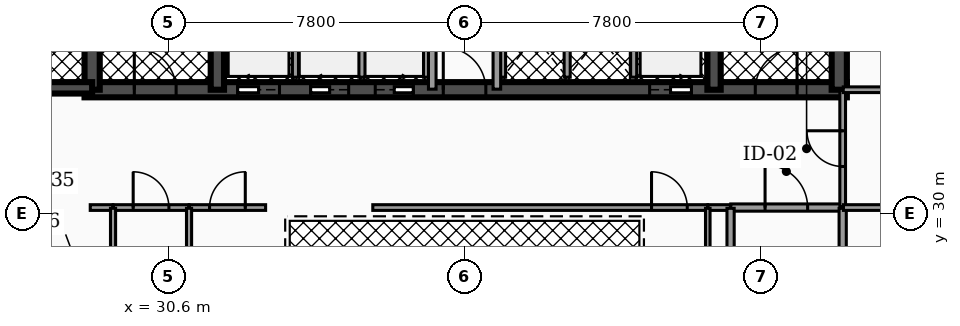
"""IFC4 building model, lengths in metres.
Left out: names, types, materials, properties, quantities, classifications, styles, units other than length and angle.
Written with IfcOpenShell. Run it as: python <this file> out.ifc"""

import sys

from ifc_helpers import new_model, si_unit, direction, frame, frame_2d, origin, place, context, subcontext, project, spatial, rectangle, extrude, element, fill, save


model = new_model("IFC4")
c1 = context("Model", 3, precision=1e-05, world=origin(), true_north=direction((0.0, 1.0)))
c2 = subcontext(c1, "Body", "Model", "MODEL_VIEW")
j1 = project(units=[si_unit("LENGTHUNIT", "METRE"), si_unit("PLANEANGLEUNIT", "RADIAN")], contexts=[c1])
p1 = place(None, origin())
s1 = spatial("IfcSite", under=j1, at=p1, CompositionType="ELEMENT")
p2 = place(p1, origin())
s2 = spatial("IfcBuilding", under=s1, at=p2, CompositionType="ELEMENT")
p3 = place(p2, frame((0.0, 0.0, 183.26)))
s3 = spatial("IfcBuildingStorey", under=s2, at=p3, CompositionType="ELEMENT", Elevation=183.26)
p4 = place(p3, frame((28.4, 33.25, 0.0), z_axis=(0.0, 0.0, 1.0), x_axis=(1.0, 0.0, 0.0)))
e1 = element("IfcWall", 1, at=p4, inside=s3, PredefinedType="SHEAR", context=c2, shape_type="SweptSolid", body=[
    extrude(rectangle(XDim=20.06, YDim=0.4, at=frame_2d((10.03, 0.0))), origin(), (0.0, 0.0, 1.0), 3.5),
])
p5 = place(p4, frame((4.03, 0.0, 0.0)))
e2 = element("IfcOpeningElement", 2, at=p5, cuts=e1, PredefinedType="OPENING", context=c2, shape_type="SweptSolid", body=[
    extrude(rectangle(XDim=1.1, YDim=2.15, at=frame_2d((0.55, 1.075))), frame((0.0, 0.21, 0.0), z_axis=(0.0, -1.0, 0.0), x_axis=(1.0, 0.0, 0.0)), (0.0, 0.0, 1.0), 0.42),
])
p6 = place(p4, frame((14.87, 0.0, 0.0)))
e3 = element("IfcOpeningElement", 3, at=p6, cuts=e1, PredefinedType="OPENING", context=c2, shape_type="SweptSolid", body=[
    extrude(rectangle(XDim=1.1, YDim=2.15, at=frame_2d((0.55, 1.075))), frame((0.0, 0.21, 0.0), z_axis=(0.0, -1.0, 0.0), x_axis=(1.0, 0.0, 0.0)), (0.0, 0.0, 1.0), 0.42),
])
p7 = place(p4, frame((5.95, 0.0, 0.0)))
e4 = element("IfcOpeningElement", 4, at=p7, cuts=e1, PredefinedType="OPENING", context=c2, shape_type="SweptSolid", body=[
    extrude(rectangle(XDim=1.0, YDim=2.1, at=frame_2d((0.5, 1.05))), frame((0.0, 0.21, 0.0), z_axis=(0.0, -1.0, 0.0), x_axis=(1.0, 0.0, 0.0)), (0.0, 0.0, 1.0), 0.42),
])
p8 = place(p4, frame((7.65, 0.0, 0.0)))
e5 = element("IfcOpeningElement", 5, at=p8, cuts=e1, PredefinedType="OPENING", context=c2, shape_type="SweptSolid", body=[
    extrude(rectangle(XDim=1.0, YDim=2.1, at=frame_2d((0.5, 1.05))), frame((0.0, 0.21, 0.0), z_axis=(0.0, -1.0, 0.0), x_axis=(1.0, 0.0, 0.0)), (0.0, 0.0, 1.0), 0.42),
])
p9 = place(p4, frame((1.31, 0.0, 0.0)))
e6 = element("IfcOpeningElement", 6, at=p9, cuts=e1, PredefinedType="OPENING", context=c2, shape_type="SweptSolid", body=[
    extrude(rectangle(XDim=1.1, YDim=2.2, at=frame_2d((0.55, 1.1))), frame((0.0, 0.21, 0.0), z_axis=(0.0, -1.0, 0.0), x_axis=(1.0, 0.0, 0.0)), (0.0, 0.0, 1.0), 0.42),
])
p10 = place(p4, frame((9.44, 0.0, 0.0)))
e7 = element("IfcOpeningElement", 7, at=p10, cuts=e1, PredefinedType="OPENING", context=c2, shape_type="SweptSolid", body=[
    extrude(rectangle(XDim=1.12, YDim=2.05, at=frame_2d((0.56, 1.025))), frame((0.0, 0.21, 0.0), z_axis=(0.0, -1.0, 0.0), x_axis=(1.0, 0.0, 0.0)), (0.0, 0.0, 1.0), 0.42),
])
p11 = place(p4, frame((17.65, 0.0, 0.0)))
e8 = element("IfcOpeningElement", 8, at=p11, cuts=e1, PredefinedType="OPENING", context=c2, shape_type="SweptSolid", body=[
    extrude(rectangle(XDim=1.1, YDim=2.2, at=frame_2d((0.55, 1.1))), frame((0.0, 0.21, 0.0), z_axis=(0.0, -1.0, 0.0), x_axis=(1.0, 0.0, 0.0)), (0.0, 0.0, 1.0), 0.42),
])
p12 = place(p3, frame((28.6, 33.25, 0.0), z_axis=(0.0, 0.0, 1.0), x_axis=(0.0, 1.0, 0.0)))
e9 = element("IfcWall", 9, at=p12, inside=s3, PredefinedType="SHEAR", context=c2, shape_type="SweptSolid", body=[
    extrude(rectangle(XDim=10.2, YDim=0.4, at=frame_2d((5.1, 0.0))), origin(), (0.0, 0.0, 1.0), 3.5),
])
for number, where, z_axis, x_axis in (
    (10, (31.895, 33.25, 0.0), (0.0, 0.0, 1.0), (0.0, 1.0, 0.0)),
    (11, (44.965, 33.25, 0.0), (0.0, 0.0, 1.0), (0.0, 1.0, 0.0)),
):
    element("IfcWall", number, at=place(p3, frame(where, z_axis=z_axis, x_axis=x_axis)), inside=s3, PredefinedType="SHEAR", context=c2, shape_type="SweptSolid", body=[
        extrude(rectangle(XDim=10.2, YDim=0.35, at=frame_2d((5.1, 0.0))), origin(), (0.0, 0.0, 1.0), 3.5),
    ])
p13 = place(p3, frame((48.26, 33.25, 0.0), z_axis=(0.0, 0.0, 1.0), x_axis=(0.0, 1.0, 0.0)))
e12 = element("IfcWall", 12, at=p13, inside=s3, PredefinedType="SHEAR", context=c2, shape_type="SweptSolid", body=[
    extrude(rectangle(XDim=10.2, YDim=0.4, at=frame_2d((5.1, 0.0))), origin(), (0.0, 0.0, 1.0), 3.5),
])
p14 = place(p3, frame((25.08, 33.3, 0.0), z_axis=(0.0, 0.0, 1.0), x_axis=(1.0, 0.0, 0.0)))
e13 = element("IfcWall", 13, at=p14, inside=s3, PredefinedType="SHEAR", context=c2, shape_type="SweptSolid", body=[
    extrude(rectangle(XDim=3.52, YDim=0.3, at=frame_2d((1.76, 0.0))), origin(), (0.0, 0.0, 1.0), 3.5),
])
p15 = place(p14, frame((1.335, 0.0, 0.0)))
e14 = element("IfcOpeningElement", 14, at=p15, cuts=e13, PredefinedType="OPENING", context=c2, shape_type="SweptSolid", body=[
    extrude(rectangle(XDim=0.95, YDim=2.2, at=frame_2d((0.475, 1.1))), frame((0.0, 0.16, 0.0), z_axis=(0.0, -1.0, 0.0), x_axis=(1.0, 0.0, 0.0)), (0.0, 0.0, 1.0), 0.32),
])
for number, where, z_axis, x_axis in (
    (15, (33.95, 33.58, 0.0), (0.0, 0.0, 1.0), (0.0, 1.0, 0.0)),
    (16, (42.85, 33.58, 0.0), (0.0, 0.0, 1.0), (0.0, 1.0, 0.0)),
):
    element("IfcWall", number, at=place(p3, frame(where, z_axis=z_axis, x_axis=x_axis)), inside=s3, PredefinedType="SOLIDWALL", context=c2, shape_type="SweptSolid", body=[
        extrude(rectangle(XDim=2.45, YDim=0.16, at=frame_2d((1.225, 0.0))), origin(), (0.0, 0.0, 1.0), 2.472),
    ])
for number, where, z_axis, x_axis in (
    (17, (35.7, 33.58, 0.0), (0.0, 0.0, 1.0), (0.0, 1.0, 0.0)),
    (18, (37.4, 33.58, 0.0), (0.0, 0.0, 1.0), (0.0, 1.0, 0.0)),
    (19, (39.4, 33.58, 0.0), (0.0, 0.0, 1.0), (0.0, 1.0, 0.0)),
    (20, (41.1, 33.58, 0.0), (0.0, 0.0, 1.0), (0.0, 1.0, 0.0)),
):
    element("IfcWall", number, at=place(p3, frame(where, z_axis=z_axis, x_axis=x_axis)), inside=s3, PredefinedType="SOLIDWALL", context=c2, shape_type="SweptSolid", body=[
        extrude(rectangle(XDim=2.25, YDim=0.16, at=frame_2d((1.125, 0.0))), origin(), (0.0, 0.0, 1.0), 2.472),
    ])
p16 = place(p3, frame((37.55, 33.265, 0.0), z_axis=(0.0, 0.0, 1.0), x_axis=(0.0, 1.0, 0.0)))
e21 = element("IfcWall", 21, at=p16, inside=s3, PredefinedType="PARTITIONING", context=c2, shape_type="SweptSolid", body=[
    extrude(rectangle(XDim=4.265, YDim=0.2, at=frame_2d((2.133, 0.0))), origin(), (0.0, 0.0, 1.0), 2.457),
])
p17 = place(p16, frame((3.093, 0.0, 0.0)))
e22 = element("IfcOpeningElement", 22, at=p17, cuts=e21, PredefinedType="OPENING", context=c2, shape_type="SweptSolid", body=[
    extrude(rectangle(XDim=0.88, YDim=2.05, at=frame_2d((0.44, 1.025))), frame((0.0, 0.11, 0.0), z_axis=(0.0, -1.0, 0.0), x_axis=(1.0, 0.0, 0.0)), (0.0, 0.0, 1.0), 0.22),
])
p18 = place(p3, frame((39.25, 33.265, 0.0), z_axis=(0.0, 0.0, 1.0), x_axis=(0.0, 1.0, 0.0)))
e23 = element("IfcWall", 23, at=p18, inside=s3, PredefinedType="PARTITIONING", context=c2, shape_type="SweptSolid", body=[
    extrude(rectangle(XDim=4.265, YDim=0.2, at=frame_2d((2.133, 0.0))), origin(), (0.0, 0.0, 1.0), 2.457),
])
p19 = place(p18, frame((3.093, 0.0, 0.0)))
e24 = element("IfcOpeningElement", 24, at=p19, cuts=e23, PredefinedType="OPENING", context=c2, shape_type="SweptSolid", body=[
    extrude(rectangle(XDim=0.88, YDim=2.05, at=frame_2d((0.44, 1.025))), frame((0.0, 0.11, 0.0), z_axis=(0.0, -1.0, 0.0), x_axis=(1.0, 0.0, 0.0)), (0.0, 0.0, 1.0), 0.22),
])
p20 = place(p3, frame((45.405, 30.15, 0.0), z_axis=(0.0, 0.0, 1.0), x_axis=(1.0, 0.0, 0.0)))
e25 = element("IfcWall", 25, at=p20, inside=s3, PredefinedType="PARTITIONING", context=c2, shape_type="SweptSolid", body=[
    extrude(rectangle(XDim=2.925, YDim=0.19, at=frame_2d((1.462, 0.0))), origin(), (0.0, 0.0, 1.0), 2.457),
])
p21 = place(p20, frame((0.903, 0.0, 0.0)))
e26 = element("IfcOpeningElement", 26, at=p21, cuts=e25, PredefinedType="OPENING", context=c2, shape_type="SweptSolid", body=[
    extrude(rectangle(XDim=1.12, YDim=2.05, at=frame_2d((0.56, 1.025))), frame((0.0, 0.105, 0.0), z_axis=(0.0, -1.0, 0.0), x_axis=(1.0, 0.0, 0.0)), (0.0, 0.0, 1.0), 0.21),
])
p22 = place(p3, frame((48.35, 30.17, 0.0), z_axis=(0.0, 0.0, 1.0), x_axis=(0.0, 1.0, 0.0)))
e27 = element("IfcWall", 27, at=p22, inside=s3, PredefinedType="PARTITIONING", context=c2, shape_type="SweptSolid", body=[
    extrude(rectangle(XDim=3.06, YDim=0.15, at=frame_2d((1.53, 0.0))), origin(), (0.0, 0.0, 1.0), 2.457),
])
p23 = place(p22, frame((1.06, 0.0, 0.0)))
e28 = element("IfcOpeningElement", 28, at=p23, cuts=e27, PredefinedType="OPENING", context=c2, shape_type="SweptSolid", body=[
    extrude(rectangle(XDim=0.94, YDim=2.05, at=frame_2d((0.47, 1.025))), frame((0.0, 0.085, 0.0), z_axis=(0.0, -1.0, 0.0), x_axis=(1.0, 0.0, 0.0)), (0.0, 0.0, 1.0), 0.17),
])
p24 = place(p3, frame((28.55, 30.15, 0.0), z_axis=(0.0, 0.0, 1.0), x_axis=(1.0, 0.0, 0.0)))
e29 = element("IfcWall", 29, at=p24, inside=s3, PredefinedType="PARTITIONING", context=c2, shape_type="SweptSolid", body=[
    extrude(rectangle(XDim=0.595, YDim=0.15, at=frame_2d((0.297, 0.0))), origin(), (0.0, 0.0, 1.0), 2.457),
])
p25 = place(p3, frame((29.155, 30.15, 0.0), z_axis=(0.0, 0.0, 1.0), x_axis=(1.0, 0.0, 0.0)))
e30 = element("IfcWall", 30, at=p25, inside=s3, PredefinedType="PARTITIONING", context=c2, shape_type="SweptSolid", body=[
    extrude(rectangle(XDim=1.99, YDim=0.15, at=frame_2d((0.995, 0.0))), origin(), (0.0, 0.0, 1.0), 2.457),
])
p26 = place(p25, frame((0.525, 0.0, 0.0)))
e31 = element("IfcOpeningElement", 31, at=p26, cuts=e30, PredefinedType="OPENING", context=c2, shape_type="SweptSolid", body=[
    extrude(rectangle(XDim=0.94, YDim=2.05, at=frame_2d((0.47, 1.025))), frame((0.0, 0.085, 0.0), z_axis=(0.0, -1.0, 0.0), x_axis=(1.0, 0.0, 0.0)), (0.0, 0.0, 1.0), 0.17),
])
p27 = place(p3, frame((31.155, 30.15, 0.0), z_axis=(0.0, 0.0, 1.0), x_axis=(1.0, 0.0, 0.0)))
e32 = element("IfcWall", 32, at=p27, inside=s3, PredefinedType="PARTITIONING", context=c2, shape_type="SweptSolid", body=[
    extrude(rectangle(XDim=2.01, YDim=0.15, at=frame_2d((1.005, 0.0))), origin(), (0.0, 0.0, 1.0), 2.457),
])
p28 = place(p27, frame((0.535, 0.0, 0.0)))
e33 = element("IfcOpeningElement", 33, at=p28, cuts=e32, PredefinedType="OPENING", context=c2, shape_type="SweptSolid", body=[
    extrude(rectangle(XDim=0.94, YDim=2.05, at=frame_2d((0.47, 1.025))), frame((0.0, 0.085, 0.0), z_axis=(0.0, -1.0, 0.0), x_axis=(1.0, 0.0, 0.0)), (0.0, 0.0, 1.0), 0.17),
])
p29 = place(p3, frame((35.985, 30.15, 0.0), z_axis=(0.0, 0.0, 1.0), x_axis=(1.0, 0.0, 0.0)))
e34 = element("IfcWall", 34, at=p29, inside=s3, PredefinedType="PARTITIONING", context=c2, shape_type="SweptSolid", body=[
    extrude(rectangle(XDim=8.81, YDim=0.15, at=frame_2d((4.405, 0.0))), origin(), (0.0, 0.0, 1.0), 2.457),
])
p30 = place(p29, frame((7.335, 0.0, 0.0)))
e35 = element("IfcOpeningElement", 35, at=p30, cuts=e34, PredefinedType="OPENING", context=c2, shape_type="SweptSolid", body=[
    extrude(rectangle(XDim=0.94, YDim=2.05, at=frame_2d((0.47, 1.025))), frame((0.0, 0.085, 0.0), z_axis=(0.0, -1.0, 0.0), x_axis=(1.0, 0.0, 0.0)), (0.0, 0.0, 1.0), 0.17),
])
p31 = place(p3, frame((44.805, 30.15, 0.0), z_axis=(0.0, 0.0, 1.0), x_axis=(1.0, 0.0, 0.0)))
e36 = element("IfcWall", 36, at=p31, inside=s3, PredefinedType="PARTITIONING", context=c2, shape_type="SweptSolid", body=[
    extrude(rectangle(XDim=0.59, YDim=0.15, at=frame_2d((0.295, 0.0))), origin(), (0.0, 0.0, 1.0), 2.457),
])
for number, where, z_axis, x_axis in (
    (37, (45.4, 27.37, 0.0), (0.0, 0.0, 1.0), (0.0, 1.0, 0.0)),
    (38, (48.35, 27.37, 0.0), (0.0, 0.0, 1.0), (0.0, 1.0, 0.0)),
):
    element("IfcWall", number, at=place(p3, frame(where, z_axis=z_axis, x_axis=x_axis)), inside=s3, PredefinedType="PARTITIONING", context=c2, shape_type="SweptSolid", body=[
        extrude(rectangle(XDim=2.76, YDim=0.19, at=frame_2d((1.38, 0.0))), origin(), (0.0, 0.0, 1.0), 2.457),
    ])
p32 = place(p3, frame((48.37, 30.15, 0.0), z_axis=(0.0, 0.0, 1.0), x_axis=(1.0, 0.0, 0.0)))
e39 = element("IfcWall", 39, at=p32, inside=s3, PredefinedType="PARTITIONING", context=c2, shape_type="SweptSolid", body=[
    extrude(rectangle(XDim=3.26, YDim=0.15, at=frame_2d((1.63, 0.0))), origin(), (0.0, 0.0, 1.0), 2.457),
])
p33 = place(p32, frame((1.16, 0.0, 0.0)))
e40 = element("IfcOpeningElement", 40, at=p33, cuts=e39, PredefinedType="OPENING", context=c2, shape_type="SweptSolid", body=[
    extrude(rectangle(XDim=0.94, YDim=2.05, at=frame_2d((0.47, 1.025))), frame((0.0, 0.085, 0.0), z_axis=(0.0, -1.0, 0.0), x_axis=(1.0, 0.0, 0.0)), (0.0, 0.0, 1.0), 0.17),
])
p34 = place(p3, frame((48.365, 33.25, 0.0), z_axis=(0.0, 0.0, 1.0), x_axis=(1.0, 0.0, 0.0)))
e41 = element("IfcWall", 41, at=p34, inside=s3, PredefinedType="PARTITIONING", context=c2, shape_type="SweptSolid", body=[
    extrude(rectangle(XDim=3.27, YDim=0.15, at=frame_2d((1.635, 0.0))), origin(), (0.0, 0.0, 1.0), 2.457),
])
p35 = place(p34, frame((1.165, 0.0, 0.0)))
e42 = element("IfcOpeningElement", 42, at=p35, cuts=e41, PredefinedType="OPENING", context=c2, shape_type="SweptSolid", body=[
    extrude(rectangle(XDim=0.94, YDim=2.05, at=frame_2d((0.47, 1.025))), frame((0.0, 0.085, 0.0), z_axis=(0.0, -1.0, 0.0), x_axis=(1.0, 0.0, 0.0)), (0.0, 0.0, 1.0), 0.17),
])
p36 = place(p3, frame((29.15, 27.17, 0.0), z_axis=(0.0, 0.0, 1.0), x_axis=(0.0, 1.0, 0.0)))
e43 = element("IfcWall", 43, at=p36, inside=s3, PredefinedType="PARTITIONING", context=c2, shape_type="SweptSolid", body=[
    extrude(rectangle(XDim=2.96, YDim=0.135, at=frame_2d((1.48, 0.0))), origin(), (0.0, 0.0, 1.0), 2.457),
])
p37 = place(p36, frame((1.05, 0.0, 0.0)))
e44 = element("IfcOpeningElement", 44, at=p37, cuts=e43, PredefinedType="OPENING", context=c2, shape_type="SweptSolid", body=[
    extrude(rectangle(XDim=0.86, YDim=2.05, at=frame_2d((0.43, 1.025))), frame((0.0, 0.077, 0.0), z_axis=(0.0, -1.0, 0.0), x_axis=(1.0, 0.0, 0.0)), (0.0, 0.0, 1.0), 0.155),
])
p38 = place(p3, frame((31.15, 27.17, 0.0), z_axis=(0.0, 0.0, 1.0), x_axis=(0.0, 1.0, 0.0)))
e45 = element("IfcWall", 45, at=p38, inside=s3, PredefinedType="PARTITIONING", context=c2, shape_type="SweptSolid", body=[
    extrude(rectangle(XDim=2.96, YDim=0.135, at=frame_2d((1.48, 0.0))), origin(), (0.0, 0.0, 1.0), 2.457),
])
p39 = place(p3, frame((44.8, 23.903, 0.0), z_axis=(0.0, 0.0, 1.0), x_axis=(0.0, 1.0, 0.0)))
e46 = element("IfcWall", 46, at=p39, inside=s3, PredefinedType="PARTITIONING", context=c2, shape_type="SweptSolid", body=[
    extrude(rectangle(XDim=6.227, YDim=0.12, at=frame_2d((3.114, 0.0))), origin(), (0.0, 0.0, 1.0), 2.457),
])
p40 = place(p5, origin())
e47 = element("IfcDoor", 47, at=p40, inside=s3, OperationType="SLIDING_TO_LEFT", PredefinedType="DOOR", context=c2, shape_type="SweptSolid", body=[
    extrude(rectangle(XDim=1.1, YDim=2.15, at=frame_2d((0.55, 1.075))), frame((0.0, 0.025, 0.0), z_axis=(0.0, -1.0, 0.0), x_axis=(1.0, 0.0, 0.0)), (0.0, 0.0, 1.0), 0.05),
])
fill(e2, e47)
p41 = place(p6, origin())
e48 = element("IfcDoor", 48, at=p41, inside=s3, OperationType="SLIDING_TO_RIGHT", PredefinedType="DOOR", context=c2, shape_type="SweptSolid", body=[
    extrude(rectangle(XDim=1.1, YDim=2.15, at=frame_2d((0.55, 1.075))), frame((0.0, 0.025, 0.0), z_axis=(0.0, -1.0, 0.0), x_axis=(1.0, 0.0, 0.0)), (0.0, 0.0, 1.0), 0.05),
])
fill(e3, e48)
p42 = place(p7, origin())
e49 = element("IfcDoor", 49, at=p42, inside=s3, OperationType="SLIDING_TO_LEFT", PredefinedType="DOOR", context=c2, shape_type="SweptSolid", body=[
    extrude(rectangle(XDim=1.0, YDim=2.1, at=frame_2d((0.5, 1.05))), frame((0.0, 0.025, 0.0), z_axis=(0.0, -1.0, 0.0), x_axis=(1.0, 0.0, 0.0)), (0.0, 0.0, 1.0), 0.05),
])
fill(e4, e49)
p43 = place(p8, origin())
e50 = element("IfcDoor", 50, at=p43, inside=s3, OperationType="SLIDING_TO_RIGHT", PredefinedType="DOOR", context=c2, shape_type="SweptSolid", body=[
    extrude(rectangle(XDim=1.0, YDim=2.1, at=frame_2d((0.5, 1.05))), frame((0.0, 0.025, 0.0), z_axis=(0.0, -1.0, 0.0), x_axis=(1.0, 0.0, 0.0)), (0.0, 0.0, 1.0), 0.05),
])
fill(e5, e50)
p44 = place(p9, origin())
e51 = element("IfcDoor", 51, at=p44, inside=s3, OperationType="SINGLE_SWING_LEFT", PredefinedType="DOOR", context=c2, shape_type="SweptSolid", body=[
    extrude(rectangle(XDim=1.1, YDim=2.2, at=frame_2d((0.55, 1.1))), frame((0.0, 0.025, 0.0), z_axis=(0.0, -1.0, 0.0), x_axis=(1.0, 0.0, 0.0)), (0.0, 0.0, 1.0), 0.05),
])
fill(e6, e51)
p45 = place(p10, origin())
e52 = element("IfcDoor", 52, at=p45, inside=s3, OperationType="SINGLE_SWING_LEFT", PredefinedType="DOOR", context=c2, shape_type="SweptSolid", body=[
    extrude(rectangle(XDim=1.12, YDim=2.05, at=frame_2d((0.56, 1.025))), frame((0.0, 0.025, 0.0), z_axis=(0.0, -1.0, 0.0), x_axis=(1.0, 0.0, 0.0)), (0.0, 0.0, 1.0), 0.05),
])
fill(e7, e52)
p46 = place(p11, origin())
e53 = element("IfcDoor", 53, at=p46, inside=s3, OperationType="SINGLE_SWING_RIGHT", PredefinedType="DOOR", context=c2, shape_type="SweptSolid", body=[
    extrude(rectangle(XDim=1.1, YDim=2.2, at=frame_2d((0.55, 1.1))), frame((0.0, 0.025, 0.0), z_axis=(0.0, -1.0, 0.0), x_axis=(1.0, 0.0, 0.0)), (0.0, 0.0, 1.0), 0.05),
])
fill(e8, e53)
p47 = place(p21, origin())
e54 = element("IfcDoor", 54, at=p47, inside=s3, OperationType="SINGLE_SWING_LEFT", PredefinedType="DOOR", context=c2, shape_type="SweptSolid", body=[
    extrude(rectangle(XDim=1.12, YDim=2.05, at=frame_2d((0.56, 1.025))), frame((0.0, 0.025, 0.0), z_axis=(0.0, -1.0, 0.0), x_axis=(1.0, 0.0, 0.0)), (0.0, 0.0, 1.0), 0.05),
])
fill(e26, e54)
p48 = place(p23, origin())
e55 = element("IfcDoor", 55, at=p48, inside=s3, OperationType="SINGLE_SWING_RIGHT", PredefinedType="DOOR", context=c2, shape_type="SweptSolid", body=[
    extrude(rectangle(XDim=0.94, YDim=2.05, at=frame_2d((0.47, 1.025))), frame((0.0, 0.025, 0.0), z_axis=(0.0, -1.0, 0.0), x_axis=(1.0, 0.0, 0.0)), (0.0, 0.0, 1.0), 0.05),
])
fill(e28, e55)
p49 = place(p26, origin())
e56 = element("IfcDoor", 56, at=p49, inside=s3, OperationType="SINGLE_SWING_LEFT", PredefinedType="DOOR", context=c2, shape_type="SweptSolid", body=[
    extrude(rectangle(XDim=0.94, YDim=2.05, at=frame_2d((0.47, 1.025))), frame((0.0, 0.025, 0.0), z_axis=(0.0, -1.0, 0.0), x_axis=(1.0, 0.0, 0.0)), (0.0, 0.0, 1.0), 0.05),
])
fill(e31, e56)
p50 = place(p28, origin())
e57 = element("IfcDoor", 57, at=p50, inside=s3, OperationType="SINGLE_SWING_RIGHT", PredefinedType="DOOR", context=c2, shape_type="SweptSolid", body=[
    extrude(rectangle(XDim=0.94, YDim=2.05, at=frame_2d((0.47, 1.025))), frame((0.0, 0.025, 0.0), z_axis=(0.0, -1.0, 0.0), x_axis=(1.0, 0.0, 0.0)), (0.0, 0.0, 1.0), 0.05),
])
fill(e33, e57)
p51 = place(p30, origin())
e58 = element("IfcDoor", 58, at=p51, inside=s3, OperationType="SINGLE_SWING_LEFT", PredefinedType="DOOR", context=c2, shape_type="SweptSolid", body=[
    extrude(rectangle(XDim=0.94, YDim=2.05, at=frame_2d((0.47, 1.025))), frame((0.0, 0.025, 0.0), z_axis=(0.0, -1.0, 0.0), x_axis=(1.0, 0.0, 0.0)), (0.0, 0.0, 1.0), 0.05),
])
fill(e35, e58)
save(model, sys.argv[1])
